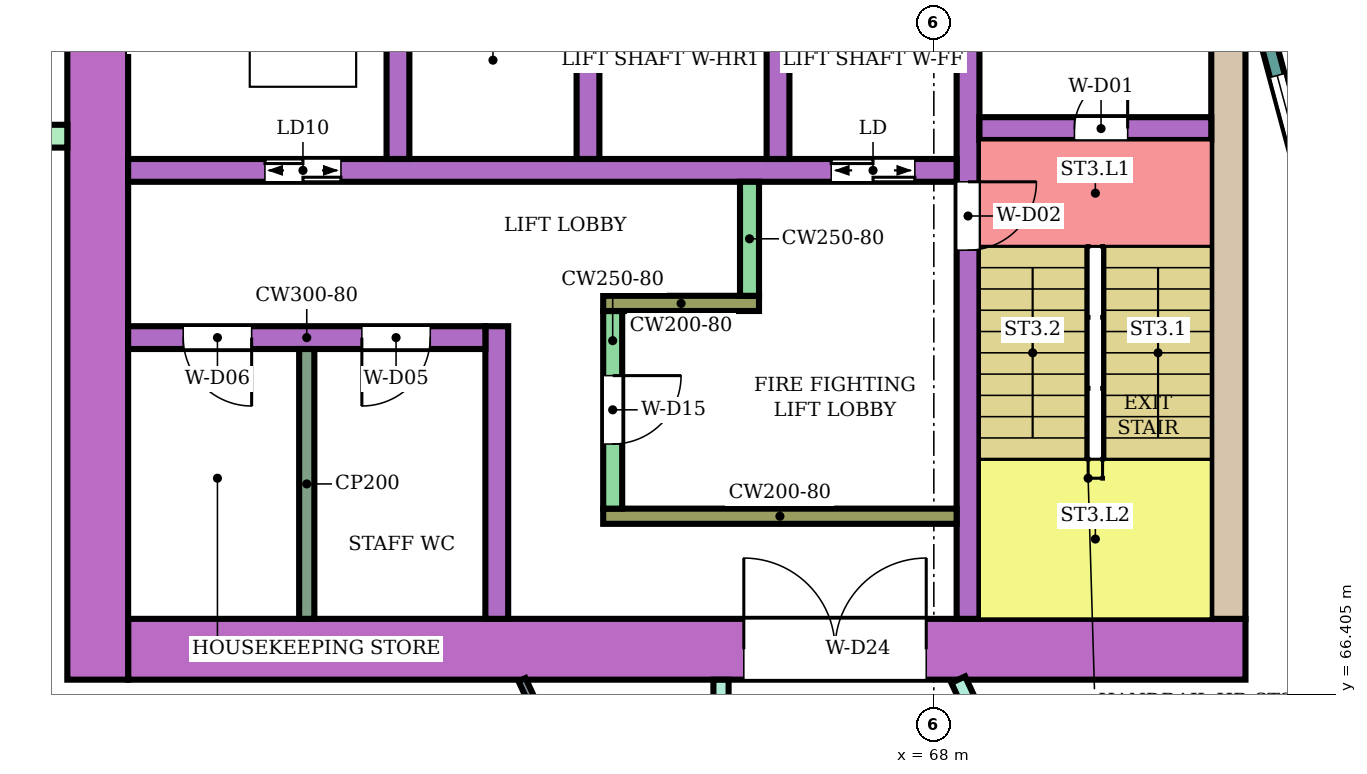
"""IFC4 building model, lengths in metres.
Left out: names, types, materials, properties, quantities, classifications, styles, units other than length and angle.
Written with IfcOpenShell. Run it as: python <this file> out.ifc"""

import sys

from ifc_helpers import new_model, si_unit, direction, frame, frame_2d, origin, place, context, subcontext, project, spatial, rectangle, extrude, element, fill, save


model = new_model("IFC4")
c1 = context("Model", 3, precision=1e-05, world=origin(), true_north=direction((0.0, 1.0)))
c2 = subcontext(c1, "Body", "Model", "MODEL_VIEW")
j1 = project(units=[si_unit("LENGTHUNIT", "METRE"), si_unit("PLANEANGLEUNIT", "RADIAN")], contexts=[c1])
p1 = place(None, origin())
s1 = spatial("IfcSite", under=j1, at=p1, CompositionType="ELEMENT")
p2 = place(p1, origin())
s2 = spatial("IfcBuilding", under=s1, at=p2, CompositionType="ELEMENT")
p3 = place(p2, frame((0.0, 0.0, 82.4)))
s3 = spatial("IfcBuildingStorey", under=s2, at=p3, CompositionType="ELEMENT", Elevation=82.4)
p4 = place(p3, frame((72.1, 67.0, 0.0), z_axis=(0.0, 0.0, 1.0), x_axis=(-1.0, 0.0, 0.0)))
e1 = element("IfcWall", 1, at=p4, inside=s3, PredefinedType="SHEAR", context=c2, shape_type="SweptSolid", body=[
    extrude(rectangle(XDim=14.7, YDim=0.8, at=frame_2d((7.35, 0.0))), origin(), (0.0, 0.0, 1.0), 3.48),
])
p5 = place(p4, frame((4.2, 0.0, 0.0)))
e2 = element("IfcOpeningElement", 2, at=p5, cuts=e1, PredefinedType="OPENING", context=c2, shape_type="SweptSolid", body=[
    extrude(rectangle(XDim=2.4, YDim=2.4, at=frame_2d((1.2, 1.2))), frame((0.0, 0.41, 0.0), z_axis=(0.0, -1.0, 0.0), x_axis=(1.0, 0.0, 0.0)), (0.0, 0.0, 1.0), 0.82),
])
p6 = place(p3, frame((71.875, 75.0, 0.0), z_axis=(0.0, 0.0, 1.0), x_axis=(0.0, -1.0, 0.0)))
e3 = element("IfcWall", 3, at=p6, inside=s3, PredefinedType="SHEAR", context=c2, shape_type="SweptSolid", body=[
    extrude(rectangle(XDim=7.6, YDim=0.45, at=frame_2d((3.8, 0.0))), origin(), (0.0, 0.0, 1.0), 3.48),
])
p7 = place(p3, frame((57.0, 83.4, 0.0), z_axis=(0.0, 0.0, 1.0), x_axis=(0.0, -1.0, 0.0)))
e4 = element("IfcWall", 4, at=p7, inside=s3, PredefinedType="SHEAR", context=c2, shape_type="SweptSolid", body=[
    extrude(rectangle(XDim=16.8, YDim=0.8, at=frame_2d((8.4, 0.0))), origin(), (0.0, 0.0, 1.0), 3.48),
])
p8 = place(p3, frame((68.45, 75.0, 0.0), z_axis=(0.0, 0.0, 1.0), x_axis=(0.0, -1.0, 0.0)))
e5 = element("IfcWall", 5, at=p8, inside=s3, PredefinedType="SHEAR", context=c2, shape_type="SweptSolid", body=[
    extrude(rectangle(XDim=7.6, YDim=0.3, at=frame_2d((3.8, 0.0))), origin(), (0.0, 0.0, 1.0), 3.48),
])
p9 = place(p8, frame((1.85, 0.0, 0.0)))
e6 = element("IfcOpeningElement", 6, at=p9, cuts=e5, PredefinedType="OPENING", context=c2, shape_type="SweptSolid", body=[
    extrude(rectangle(XDim=0.9, YDim=2.1, at=frame_2d((0.45, 1.05))), frame((0.0, 0.16, 0.0), z_axis=(0.0, -1.0, 0.0), x_axis=(1.0, 0.0, 0.0)), (0.0, 0.0, 1.0), 0.32),
])
p10 = place(p3, frame((71.65, 73.85, 0.0), z_axis=(0.0, 0.0, 1.0), x_axis=(-1.0, 0.0, 0.0)))
e7 = element("IfcWall", 7, at=p10, inside=s3, PredefinedType="SHEAR", context=c2, shape_type="SweptSolid", body=[
    extrude(rectangle(XDim=3.05, YDim=0.3, at=frame_2d((1.525, 0.0))), origin(), (0.0, 0.0, 1.0), 3.48),
])
p11 = place(p10, frame((1.1, 0.0, 0.0)))
e8 = element("IfcOpeningElement", 8, at=p11, cuts=e7, PredefinedType="OPENING", context=c2, shape_type="SweptSolid", body=[
    extrude(rectangle(XDim=0.7, YDim=2.0, at=frame_2d((0.35, 1.0))), frame((0.0, 0.16, 0.0), z_axis=(0.0, -1.0, 0.0), x_axis=(1.0, 0.0, 0.0)), (0.0, 0.0, 1.0), 0.32),
])
p12 = place(p3, frame((68.3, 73.3, 0.0), z_axis=(0.0, 0.0, 1.0), x_axis=(-1.0, 0.0, 0.0)))
e9 = element("IfcWall", 9, at=p12, inside=s3, PredefinedType="SHEAR", context=c2, shape_type="SweptSolid", body=[
    extrude(rectangle(XDim=10.9, YDim=0.3, at=frame_2d((5.45, 0.0))), origin(), (0.0, 0.0, 1.0), 3.48),
])
p13 = place(p12, frame((0.55, 0.0, 0.0)))
e10 = element("IfcOpeningElement", 10, at=p13, cuts=e9, PredefinedType="OPENING", context=c2, shape_type="SweptSolid", body=[
    extrude(rectangle(XDim=1.1, YDim=2.1, at=frame_2d((0.55, 1.05))), frame((0.0, 0.16, 0.0), z_axis=(0.0, -1.0, 0.0), x_axis=(1.0, 0.0, 0.0)), (0.0, 0.0, 1.0), 0.32),
])
p14 = place(p12, frame((8.1, 0.0, 0.0)))
e11 = element("IfcOpeningElement", 11, at=p14, cuts=e9, PredefinedType="OPENING", context=c2, shape_type="SweptSolid", body=[
    extrude(rectangle(XDim=1.0, YDim=2.1, at=frame_2d((0.5, 1.05))), frame((0.0, 0.16, 0.0), z_axis=(0.0, -1.0, 0.0), x_axis=(1.0, 0.0, 0.0)), (0.0, 0.0, 1.0), 0.32),
])
for number, where, z_axis, x_axis in (
    (12, (65.95, 76.0, 0.0), (0.0, 0.0, 1.0), (0.0, -1.0, 0.0)),
    (13, (63.45, 76.0, 0.0), (0.0, 0.0, 1.0), (0.0, -1.0, 0.0)),
    (14, (60.95, 76.0, 0.0), (0.0, 0.0, 1.0), (0.0, -1.0, 0.0)),
):
    element("IfcWall", number, at=place(p3, frame(where, z_axis=z_axis, x_axis=x_axis)), inside=s3, PredefinedType="SHEAR", context=c2, shape_type="SweptSolid", body=[
        extrude(rectangle(XDim=2.55, YDim=0.3, at=frame_2d((1.275, 0.0))), origin(), (0.0, 0.0, 1.0), 3.48),
    ])
p15 = place(p3, frame((68.3, 68.75, 0.0), z_axis=(0.0, 0.0, 1.0), x_axis=(-1.0, 0.0, 0.0)))
e15 = element("IfcWall", 15, at=p15, inside=s3, PredefinedType="SHEAR", context=c2, shape_type="SweptSolid", body=[
    extrude(rectangle(XDim=4.65, YDim=0.2, at=frame_2d((2.325, 0.0))), origin(), (0.0, 0.0, 1.0), 3.48),
])
p16 = place(p3, frame((63.775, 71.45, 0.0), z_axis=(0.0, 0.0, 1.0), x_axis=(0.0, -1.0, 0.0)))
e16 = element("IfcWall", 16, at=p16, inside=s3, PredefinedType="SHEAR", context=c2, shape_type="SweptSolid", body=[
    extrude(rectangle(XDim=2.6, YDim=0.25, at=frame_2d((1.3, 0.0))), origin(), (0.0, 0.0, 1.0), 3.48),
])
p17 = place(p16, frame((0.85, 0.0, 0.0)))
e17 = element("IfcOpeningElement", 17, at=p17, cuts=e16, PredefinedType="OPENING", context=c2, shape_type="SweptSolid", body=[
    extrude(rectangle(XDim=0.9, YDim=2.1, at=frame_2d((0.45, 1.05))), frame((0.0, 0.135, 0.0), z_axis=(0.0, -1.0, 0.0), x_axis=(1.0, 0.0, 0.0)), (0.0, 0.0, 1.0), 0.27),
])
p18 = place(p3, frame((65.7, 71.55, 0.0), z_axis=(0.0, 0.0, 1.0), x_axis=(-1.0, 0.0, 0.0)))
e18 = element("IfcWall", 18, at=p18, inside=s3, PredefinedType="SHEAR", context=c2, shape_type="SweptSolid", body=[
    extrude(rectangle(XDim=2.05, YDim=0.2, at=frame_2d((1.025, 0.0))), origin(), (0.0, 0.0, 1.0), 3.48),
])
p19 = place(p3, frame((65.575, 73.15, 0.0), z_axis=(0.0, 0.0, 1.0), x_axis=(0.0, -1.0, 0.0)))
e19 = element("IfcWall", 19, at=p19, inside=s3, PredefinedType="SHEAR", context=c2, shape_type="SweptSolid", body=[
    extrude(rectangle(XDim=1.5, YDim=0.25, at=frame_2d((0.75, 0.0))), origin(), (0.0, 0.0, 1.0), 3.48),
])
p20 = place(p3, frame((62.25, 71.25, 0.0), z_axis=(0.0, 0.0, 1.0), x_axis=(0.0, -1.0, 0.0)))
e20 = element("IfcWall", 20, at=p20, inside=s3, PredefinedType="SHEAR", context=c2, shape_type="SweptSolid", body=[
    extrude(rectangle(XDim=3.85, YDim=0.3, at=frame_2d((1.925, 0.0))), origin(), (0.0, 0.0, 1.0), 3.48),
])
p21 = place(p3, frame((62.1, 71.1, 0.0), z_axis=(0.0, 0.0, 1.0), x_axis=(-1.0, 0.0, 0.0)))
e21 = element("IfcWall", 21, at=p21, inside=s3, PredefinedType="SHEAR", context=c2, shape_type="SweptSolid", body=[
    extrude(rectangle(XDim=4.7, YDim=0.3, at=frame_2d((2.35, 0.0))), origin(), (0.0, 0.0, 1.0), 3.48),
])
p22 = place(p21, frame((0.725, 0.0, 0.0)))
e22 = element("IfcOpeningElement", 22, at=p22, cuts=e21, PredefinedType="OPENING", context=c2, shape_type="SweptSolid", body=[
    extrude(rectangle(XDim=0.9, YDim=2.1, at=frame_2d((0.45, 1.05))), frame((0.0, 0.16, 0.0), z_axis=(0.0, -1.0, 0.0), x_axis=(1.0, 0.0, 0.0)), (0.0, 0.0, 1.0), 0.32),
])
p23 = place(p21, frame((3.075, 0.0, 0.0)))
e23 = element("IfcOpeningElement", 23, at=p23, cuts=e21, PredefinedType="OPENING", context=c2, shape_type="SweptSolid", body=[
    extrude(rectangle(XDim=0.9, YDim=2.1, at=frame_2d((0.45, 1.05))), frame((0.0, 0.16, 0.0), z_axis=(0.0, -1.0, 0.0), x_axis=(1.0, 0.0, 0.0)), (0.0, 0.0, 1.0), 0.32),
])
p24 = place(p3, frame((56.6, 73.75, 0.0), z_axis=(0.0, 0.0, 1.0), x_axis=(-1.0, 0.0, 0.0)))
e24 = element("IfcWall", 24, at=p24, inside=s3, PredefinedType="NOTDEFINED", context=c2, shape_type="SweptSolid", body=[
    extrude(rectangle(XDim=2.416, YDim=0.3, at=frame_2d((1.208, 0.0))), origin(), (0.0, 0.0, 1.0), 3.8),
])
p25 = place(p3, frame((72.396, 75.0, 0.0), z_axis=(0.0, 0.0, 1.0), x_axis=(0.258789828301, -0.965933654434, 0.0)))
e25 = element("IfcWall", 25, at=p25, inside=s3, PredefinedType="NOTDEFINED", context=c2, shape_type="SweptSolid", body=[
    extrude(rectangle(XDim=3.936, YDim=0.2, at=frame_2d((1.968, 0.0))), origin(), (0.0, 0.0, 1.0), 3.8),
])
p26 = place(p25, frame((0.468, 0.0, 0.9)))
e26 = element("IfcOpeningElement", 26, at=p26, cuts=e25, PredefinedType="OPENING", context=c2, shape_type="SweptSolid", body=[
    extrude(rectangle(XDim=3.0, YDim=2.3, at=frame_2d((1.5, 1.15))), frame((0.0, 0.11, 0.0), z_axis=(0.0, -1.0, 0.0), x_axis=(1.0, 0.0, 0.0)), (0.0, 0.0, 1.0), 0.22),
])
p27 = place(p3, frame((65.2, 65.2, 0.0), z_axis=(0.0, 0.0, 1.0), x_axis=(0.0, 1.0, 0.0)))
e27 = element("IfcWall", 27, at=p27, inside=s3, PredefinedType="PARTITIONING", context=c2, shape_type="SweptSolid", body=[
    extrude(rectangle(XDim=1.399, YDim=0.2, at=frame_2d((0.7, 0.0))), origin(), (0.0, 0.0, 1.0), 3.35),
])
p28 = place(p3, frame((68.321, 66.6, 0.0), z_axis=(0.0, 0.0, 1.0), x_axis=(0.421914092414, -0.906635813666, 0.0)))
e28 = element("IfcWall", 28, at=p28, inside=s3, PredefinedType="PARTITIONING", context=c2, shape_type="SweptSolid", body=[
    extrude(rectangle(XDim=7.459, YDim=0.2, at=frame_2d((3.73, 0.0))), origin(), (0.0, 0.0, 1.0), 3.35),
])
p29 = place(p28, frame((0.7, 0.0, 0.0)))
e29 = element("IfcOpeningElement", 29, at=p29, cuts=e28, PredefinedType="OPENING", context=c2, shape_type="SweptSolid", body=[
    extrude(rectangle(XDim=1.0, YDim=2.1, at=frame_2d((0.5, 1.05))), frame((0.0, 0.11, 0.0), z_axis=(0.0, -1.0, 0.0), x_axis=(1.0, 0.0, 0.0)), (0.0, 0.0, 1.0), 0.22),
])
p30 = place(p3, frame((71.459, 60.218, 0.0), z_axis=(0.0, 0.0, 1.0), x_axis=(0.500232027118, 0.865891401416, 0.0)))
e30 = element("IfcWall", 30, at=p30, inside=s3, PredefinedType="PARTITIONING", context=c2, shape_type="SweptSolid", body=[
    extrude(rectangle(XDim=9.372, YDim=0.2, at=frame_2d((4.686, 0.0))), origin(), (0.0, 0.0, 1.0), 3.35),
])
p31 = place(p3, frame((62.582, 66.6, 0.0), z_axis=(0.0, 0.0, 1.0), x_axis=(0.422283870085, -0.906463641337, 0.0)))
e31 = element("IfcWall", 31, at=p31, inside=s3, PredefinedType="PARTITIONING", context=c2, shape_type="SweptSolid", body=[
    extrude(rectangle(XDim=6.666, YDim=0.1, at=frame_2d((3.333, 0.0))), origin(), (0.0, 0.0, 1.0), 3.35),
])
p32 = place(p31, frame((1.953, 0.0, 0.0)))
e32 = element("IfcOpeningElement", 32, at=p32, cuts=e31, PredefinedType="OPENING", context=c2, shape_type="SweptSolid", body=[
    extrude(rectangle(XDim=0.9, YDim=2.1, at=frame_2d((0.45, 1.05))), frame((0.0, 0.06, 0.0), z_axis=(0.0, -1.0, 0.0), x_axis=(1.0, 0.0, 0.0)), (0.0, 0.0, 1.0), 0.12),
])
p33 = place(p3, frame((59.75, 70.95, 0.0), z_axis=(0.0, 0.0, 1.0), x_axis=(0.0, -1.0, 0.0)))
e33 = element("IfcWall", 33, at=p33, inside=s3, PredefinedType="PARTITIONING", context=c2, shape_type="SweptSolid", body=[
    extrude(rectangle(XDim=3.55, YDim=0.2, at=frame_2d((1.775, 0.0))), origin(), (0.0, 0.0, 1.0), 3.48),
])
p34 = place(p26, origin())
e34 = element("IfcWindow", 34, at=p34, inside=s3, PartitioningType="SINGLE_PANEL", PredefinedType="WINDOW", context=c2, shape_type="SweptSolid", body=[
    extrude(rectangle(XDim=3.0, YDim=2.3, at=frame_2d((1.5, 1.15))), frame((0.0, 0.03, 0.0), z_axis=(0.0, -1.0, 0.0), x_axis=(1.0, 0.0, 0.0)), (0.0, 0.0, 1.0), 0.06),
])
fill(e26, e34)
p35 = place(p11, frame((0.7, 0.0, 0.0), z_axis=(0.0, 0.0, 1.0), x_axis=(-1.0, 0.0, 0.0)))
e35 = element("IfcDoor", 35, at=p35, inside=s3, OperationType="SINGLE_SWING_RIGHT", PredefinedType="DOOR", context=c2, shape_type="SweptSolid", body=[
    extrude(rectangle(XDim=0.7, YDim=2.0, at=frame_2d((0.35, 1.0))), frame((0.0, 0.025, 0.0), z_axis=(0.0, -1.0, 0.0), x_axis=(1.0, 0.0, 0.0)), (0.0, 0.0, 1.0), 0.05),
])
fill(e8, e35)
p36 = place(p9, origin())
e36 = element("IfcDoor", 36, at=p36, inside=s3, OperationType="SINGLE_SWING_LEFT", PredefinedType="DOOR", context=c2, shape_type="SweptSolid", body=[
    extrude(rectangle(XDim=0.9, YDim=2.1, at=frame_2d((0.45, 1.05))), frame((0.0, 0.025, 0.0), z_axis=(0.0, -1.0, 0.0), x_axis=(1.0, 0.0, 0.0)), (0.0, 0.0, 1.0), 0.05),
])
fill(e6, e36)
p37 = place(p13, origin())
e37 = element("IfcDoor", 37, at=p37, inside=s3, OperationType="DOUBLE_DOOR_SLIDING", PredefinedType="DOOR", context=c2, shape_type="SweptSolid", body=[
    extrude(rectangle(XDim=1.1, YDim=2.1, at=frame_2d((0.55, 1.05))), frame((0.0, 0.025, 0.0), z_axis=(0.0, -1.0, 0.0), x_axis=(1.0, 0.0, 0.0)), (0.0, 0.0, 1.0), 0.05),
])
fill(e10, e37)
p38 = place(p14, origin())
e38 = element("IfcDoor", 38, at=p38, inside=s3, OperationType="DOUBLE_DOOR_SLIDING", PredefinedType="DOOR", context=c2, shape_type="SweptSolid", body=[
    extrude(rectangle(XDim=1.0, YDim=2.1, at=frame_2d((0.5, 1.05))), frame((0.0, 0.025, 0.0), z_axis=(0.0, -1.0, 0.0), x_axis=(1.0, 0.0, 0.0)), (0.0, 0.0, 1.0), 0.05),
])
fill(e11, e38)
p39 = place(p17, origin())
e39 = element("IfcDoor", 39, at=p39, inside=s3, OperationType="SINGLE_SWING_LEFT", PredefinedType="DOOR", context=c2, shape_type="SweptSolid", body=[
    extrude(rectangle(XDim=0.9, YDim=2.1, at=frame_2d((0.45, 1.05))), frame((0.0, 0.025, 0.0), z_axis=(0.0, -1.0, 0.0), x_axis=(1.0, 0.0, 0.0)), (0.0, 0.0, 1.0), 0.05),
])
fill(e17, e39)
p40 = place(p22, origin())
e40 = element("IfcDoor", 40, at=p40, inside=s3, OperationType="SINGLE_SWING_RIGHT", PredefinedType="DOOR", context=c2, shape_type="SweptSolid", body=[
    extrude(rectangle(XDim=0.9, YDim=2.1, at=frame_2d((0.45, 1.05))), frame((0.0, 0.025, 0.0), z_axis=(0.0, -1.0, 0.0), x_axis=(1.0, 0.0, 0.0)), (0.0, 0.0, 1.0), 0.05),
])
fill(e22, e40)
p41 = place(p23, origin())
e41 = element("IfcDoor", 41, at=p41, inside=s3, OperationType="SINGLE_SWING_LEFT", PredefinedType="DOOR", context=c2, shape_type="SweptSolid", body=[
    extrude(rectangle(XDim=0.9, YDim=2.1, at=frame_2d((0.45, 1.05))), frame((0.0, 0.025, 0.0), z_axis=(0.0, -1.0, 0.0), x_axis=(1.0, 0.0, 0.0)), (0.0, 0.0, 1.0), 0.05),
])
fill(e23, e41)
p42 = place(p5, frame((2.4, 0.0, 0.0), z_axis=(0.0, 0.0, 1.0), x_axis=(-1.0, 0.0, 0.0)))
e42 = element("IfcDoor", 42, at=p42, inside=s3, OperationType="DOUBLE_DOOR_SINGLE_SWING", PredefinedType="DOOR", context=c2, shape_type="SweptSolid", body=[
    extrude(rectangle(XDim=2.4, YDim=2.4, at=frame_2d((1.2, 1.2))), frame((0.0, 0.025, 0.0), z_axis=(0.0, -1.0, 0.0), x_axis=(1.0, 0.0, 0.0)), (0.0, 0.0, 1.0), 0.05),
])
fill(e2, e42)
save(model, sys.argv[1])
